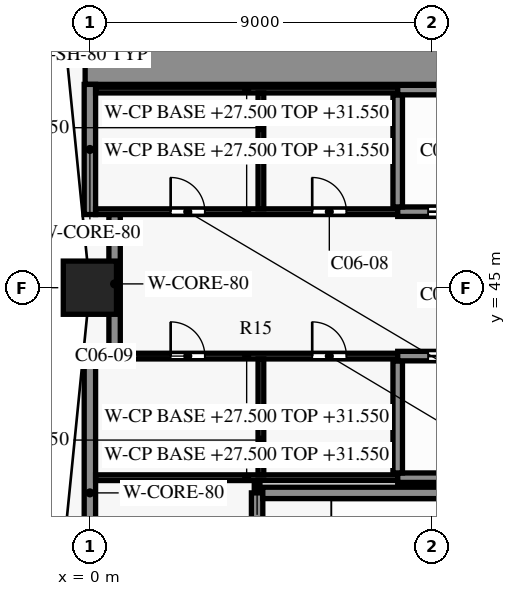
"""IFC4 building model, lengths in metres.
Left out: names, types, materials, properties, quantities, classifications, styles, units other than length and angle.
Written with IfcOpenShell. Run it as: python <this file> out.ifc"""

import sys

from ifc_helpers import new_model, si_unit, direction, frame, frame_2d, origin, origin_2d, place, context, subcontext, project, spatial, rectangle, extrude, element, fill, save


model = new_model("IFC4")
c1 = context("Model", 3, precision=1e-05, world=origin(), true_north=direction((0.0, 1.0)))
c2 = subcontext(c1, "Body", "Model", "MODEL_VIEW")
j1 = project(units=[si_unit("LENGTHUNIT", "METRE"), si_unit("PLANEANGLEUNIT", "RADIAN")], contexts=[c1])
p1 = place(None, origin())
s1 = spatial("IfcSite", under=j1, at=p1, CompositionType="ELEMENT")
p2 = place(p1, origin())
s2 = spatial("IfcBuilding", under=s1, at=p2, CompositionType="ELEMENT")
p3 = place(p2, frame((0.0, 0.0, 27.5)))
s3 = spatial("IfcBuildingStorey", under=s2, at=p3, CompositionType="ELEMENT", Elevation=27.5)
p4 = place(p3, frame((0.0, 45.0, 0.0), z_axis=(0.0, 0.0, 1.0), x_axis=(1.0, 0.0, 0.0)))
e1 = element("IfcColumn", 1, at=p4, inside=s3, PredefinedType="COLUMN", context=c2, shape_type="SweptSolid", body=[
    extrude(rectangle(XDim=1.4, YDim=1.4, at=origin_2d()), origin(), (0.0, 0.0, 1.0), 4.5),
])
p5 = place(p3, frame((4.55, 39.6, 0.0), z_axis=(0.0, 0.0, 1.0), x_axis=(1.0, 0.0, 0.0)))
e2 = element("IfcWall", 2, at=p5, inside=s3, PredefinedType="SHEAR", context=c2, shape_type="SweptSolid", body=[
    extrude(rectangle(XDim=7.7, YDim=0.3, at=frame_2d((3.85, 0.0))), origin(), (0.0, 0.0, 1.0), 4.2),
])
p6 = place(p3, frame((0.15, 40.0, 0.0), z_axis=(0.0, 0.0, 1.0), x_axis=(1.0, 0.0, 0.0)))
e3 = element("IfcWall", 3, at=p6, inside=s3, PredefinedType="PARTITIONING", context=c2, shape_type="SweptSolid", body=[
    extrude(rectangle(XDim=7.95, YDim=0.15, at=frame_2d((3.975, 0.0))), origin(), (0.0, 0.0, 1.0), 4.05),
])
p7 = place(p3, frame((8.1, 40.0, 0.0), z_axis=(0.0, 0.0, 1.0), x_axis=(1.0, 0.0, 0.0)))
e4 = element("IfcWall", 4, at=p7, inside=s3, PredefinedType="SHEAR", context=c2, shape_type="SweptSolid", body=[
    extrude(rectangle(XDim=16.075, YDim=0.25, at=frame_2d((8.038, 0.0))), origin(), (0.0, 0.0, 1.0), 4.2),
])
p8 = place(p3, frame((0.15, 43.2, 0.0), z_axis=(0.0, 0.0, 1.0), x_axis=(1.0, 0.0, 0.0)))
e5 = element("IfcWall", 5, at=p8, inside=s3, PredefinedType="PARTITIONING", context=c2, shape_type="SweptSolid", body=[
    extrude(rectangle(XDim=7.95, YDim=0.15, at=frame_2d((3.975, 0.0))), origin(), (0.0, 0.0, 1.0), 4.05),
])
p9 = place(p8, frame((1.975, 0.0, 0.0)))
e6 = element("IfcOpeningElement", 6, at=p9, cuts=e5, PredefinedType="OPENING", context=c2, shape_type="SweptSolid", body=[
    extrude(rectangle(XDim=0.9, YDim=2.1, at=frame_2d((0.45, 1.05))), frame((0.0, 0.085, 0.0), z_axis=(0.0, -1.0, 0.0), x_axis=(1.0, 0.0, 0.0)), (0.0, 0.0, 1.0), 0.17),
])
p10 = place(p8, frame((5.7, 0.0, 0.0)))
e7 = element("IfcOpeningElement", 7, at=p10, cuts=e5, PredefinedType="OPENING", context=c2, shape_type="SweptSolid", body=[
    extrude(rectangle(XDim=0.9, YDim=2.1, at=frame_2d((0.45, 1.05))), frame((0.0, 0.085, 0.0), z_axis=(0.0, -1.0, 0.0), x_axis=(1.0, 0.0, 0.0)), (0.0, 0.0, 1.0), 0.17),
])
p11 = place(p3, frame((8.1, 43.2, 0.0), z_axis=(0.0, 0.0, 1.0), x_axis=(1.0, 0.0, 0.0)))
e8 = element("IfcWall", 8, at=p11, inside=s3, PredefinedType="SHEAR", context=c2, shape_type="SweptSolid", body=[
    extrude(rectangle(XDim=16.075, YDim=0.25, at=frame_2d((8.038, 0.0))), origin(), (0.0, 0.0, 1.0), 4.2),
])
p12 = place(p11, frame((14.3, 0.0, 0.0)))
e9 = element("IfcOpeningElement", 9, at=p12, cuts=e8, PredefinedType="OPENING", context=c2, shape_type="SweptSolid", body=[
    extrude(rectangle(XDim=1.1, YDim=2.1, at=frame_2d((0.55, 1.05))), frame((0.0, 0.135, 0.0), z_axis=(0.0, -1.0, 0.0), x_axis=(1.0, 0.0, 0.0)), (0.0, 0.0, 1.0), 0.27),
])
p13 = place(p11, frame((0.8, 0.0, 0.0)))
e10 = element("IfcOpeningElement", 10, at=p13, cuts=e8, PredefinedType="OPENING", context=c2, shape_type="SweptSolid", body=[
    extrude(rectangle(XDim=1.1, YDim=2.1, at=frame_2d((0.55, 1.05))), frame((0.0, 0.135, 0.0), z_axis=(0.0, -1.0, 0.0), x_axis=(1.0, 0.0, 0.0)), (0.0, 0.0, 1.0), 0.27),
])
p14 = place(p11, frame((3.5, 0.0, 0.0)))
e11 = element("IfcOpeningElement", 11, at=p14, cuts=e8, PredefinedType="OPENING", context=c2, shape_type="SweptSolid", body=[
    extrude(rectangle(XDim=1.1, YDim=2.1, at=frame_2d((0.55, 1.05))), frame((0.0, 0.135, 0.0), z_axis=(0.0, -1.0, 0.0), x_axis=(1.0, 0.0, 0.0)), (0.0, 0.0, 1.0), 0.27),
])
p15 = place(p11, frame((6.2, 0.0, 0.0)))
e12 = element("IfcOpeningElement", 12, at=p15, cuts=e8, PredefinedType="OPENING", context=c2, shape_type="SweptSolid", body=[
    extrude(rectangle(XDim=1.1, YDim=2.1, at=frame_2d((0.55, 1.05))), frame((0.0, 0.135, 0.0), z_axis=(0.0, -1.0, 0.0), x_axis=(1.0, 0.0, 0.0)), (0.0, 0.0, 1.0), 0.27),
])
p16 = place(p11, frame((8.9, 0.0, 0.0)))
e13 = element("IfcOpeningElement", 13, at=p16, cuts=e8, PredefinedType="OPENING", context=c2, shape_type="SweptSolid", body=[
    extrude(rectangle(XDim=1.1, YDim=2.1, at=frame_2d((0.55, 1.05))), frame((0.0, 0.135, 0.0), z_axis=(0.0, -1.0, 0.0), x_axis=(1.0, 0.0, 0.0)), (0.0, 0.0, 1.0), 0.27),
])
p17 = place(p11, frame((11.6, 0.0, 0.0)))
e14 = element("IfcOpeningElement", 14, at=p17, cuts=e8, PredefinedType="OPENING", context=c2, shape_type="SweptSolid", body=[
    extrude(rectangle(XDim=1.1, YDim=2.1, at=frame_2d((0.55, 1.05))), frame((0.0, 0.135, 0.0), z_axis=(0.0, -1.0, 0.0), x_axis=(1.0, 0.0, 0.0)), (0.0, 0.0, 1.0), 0.27),
])
p18 = place(p3, frame((0.15, 47.0, 0.0), z_axis=(0.0, 0.0, 1.0), x_axis=(1.0, 0.0, 0.0)))
e15 = element("IfcWall", 15, at=p18, inside=s3, PredefinedType="PARTITIONING", context=c2, shape_type="SweptSolid", body=[
    extrude(rectangle(XDim=7.95, YDim=0.15, at=frame_2d((3.975, 0.0))), origin(), (0.0, 0.0, 1.0), 4.05),
])
p19 = place(p18, frame((1.975, 0.0, 0.0)))
e16 = element("IfcOpeningElement", 16, at=p19, cuts=e15, PredefinedType="OPENING", context=c2, shape_type="SweptSolid", body=[
    extrude(rectangle(XDim=0.9, YDim=2.1, at=frame_2d((0.45, 1.05))), frame((0.0, 0.085, 0.0), z_axis=(0.0, -1.0, 0.0), x_axis=(1.0, 0.0, 0.0)), (0.0, 0.0, 1.0), 0.17),
])
p20 = place(p18, frame((5.7, 0.0, 0.0)))
e17 = element("IfcOpeningElement", 17, at=p20, cuts=e15, PredefinedType="OPENING", context=c2, shape_type="SweptSolid", body=[
    extrude(rectangle(XDim=0.9, YDim=2.1, at=frame_2d((0.45, 1.05))), frame((0.0, 0.085, 0.0), z_axis=(0.0, -1.0, 0.0), x_axis=(1.0, 0.0, 0.0)), (0.0, 0.0, 1.0), 0.17),
])
p21 = place(p3, frame((8.1, 47.0, 0.0), z_axis=(0.0, 0.0, 1.0), x_axis=(1.0, 0.0, 0.0)))
e18 = element("IfcWall", 18, at=p21, inside=s3, PredefinedType="SHEAR", context=c2, shape_type="SweptSolid", body=[
    extrude(rectangle(XDim=13.5, YDim=0.25, at=frame_2d((6.75, 0.0))), origin(), (0.0, 0.0, 1.0), 4.2),
])
p22 = place(p21, frame((0.8, 0.0, 0.0)))
e19 = element("IfcOpeningElement", 19, at=p22, cuts=e18, PredefinedType="OPENING", context=c2, shape_type="SweptSolid", body=[
    extrude(rectangle(XDim=1.1, YDim=2.1, at=frame_2d((0.55, 1.05))), frame((0.0, 0.135, 0.0), z_axis=(0.0, -1.0, 0.0), x_axis=(1.0, 0.0, 0.0)), (0.0, 0.0, 1.0), 0.27),
])
p23 = place(p21, frame((3.5, 0.0, 0.0)))
e20 = element("IfcOpeningElement", 20, at=p23, cuts=e18, PredefinedType="OPENING", context=c2, shape_type="SweptSolid", body=[
    extrude(rectangle(XDim=1.1, YDim=2.1, at=frame_2d((0.55, 1.05))), frame((0.0, 0.135, 0.0), z_axis=(0.0, -1.0, 0.0), x_axis=(1.0, 0.0, 0.0)), (0.0, 0.0, 1.0), 0.27),
])
p24 = place(p21, frame((6.2, 0.0, 0.0)))
e21 = element("IfcOpeningElement", 21, at=p24, cuts=e18, PredefinedType="OPENING", context=c2, shape_type="SweptSolid", body=[
    extrude(rectangle(XDim=1.1, YDim=2.1, at=frame_2d((0.55, 1.05))), frame((0.0, 0.135, 0.0), z_axis=(0.0, -1.0, 0.0), x_axis=(1.0, 0.0, 0.0)), (0.0, 0.0, 1.0), 0.27),
])
p25 = place(p21, frame((8.9, 0.0, 0.0)))
e22 = element("IfcOpeningElement", 22, at=p25, cuts=e18, PredefinedType="OPENING", context=c2, shape_type="SweptSolid", body=[
    extrude(rectangle(XDim=1.1, YDim=2.1, at=frame_2d((0.55, 1.05))), frame((0.0, 0.135, 0.0), z_axis=(0.0, -1.0, 0.0), x_axis=(1.0, 0.0, 0.0)), (0.0, 0.0, 1.0), 0.27),
])
p26 = place(p21, frame((11.6, 0.0, 0.0)))
e23 = element("IfcOpeningElement", 23, at=p26, cuts=e18, PredefinedType="OPENING", context=c2, shape_type="SweptSolid", body=[
    extrude(rectangle(XDim=1.1, YDim=2.1, at=frame_2d((0.55, 1.05))), frame((0.0, 0.135, 0.0), z_axis=(0.0, -1.0, 0.0), x_axis=(1.0, 0.0, 0.0)), (0.0, 0.0, 1.0), 0.27),
])
p27 = place(p3, frame((0.15, 50.2, 0.0), z_axis=(0.0, 0.0, 1.0), x_axis=(1.0, 0.0, 0.0)))
e24 = element("IfcWall", 24, at=p27, inside=s3, PredefinedType="PARTITIONING", context=c2, shape_type="SweptSolid", body=[
    extrude(rectangle(XDim=7.95, YDim=0.15, at=frame_2d((3.975, 0.0))), origin(), (0.0, 0.0, 1.0), 4.05),
])
p28 = place(p3, frame((8.1, 50.2, 0.0), z_axis=(0.0, 0.0, 1.0), x_axis=(1.0, 0.0, 0.0)))
e25 = element("IfcWall", 25, at=p28, inside=s3, PredefinedType="SHEAR", context=c2, shape_type="SweptSolid", body=[
    extrude(rectangle(XDim=13.375, YDim=0.25, at=frame_2d((6.688, 0.0))), origin(), (0.0, 0.0, 1.0), 4.2),
])
p29 = place(p3, frame((-0.125, 51.0, 0.0), z_axis=(0.0, 0.0, 1.0), x_axis=(1.0, 0.0, 0.0)))
e26 = element("IfcWall", 26, at=p29, inside=s3, PredefinedType="SHEAR", context=c2, shape_type="SweptSolid", body=[
    extrude(rectangle(XDim=21.625, YDim=1.3, at=frame_2d((10.812, 0.0))), origin(), (0.0, 0.0, 1.0), 4.2),
])
p30 = place(p3, frame((0.0, 35.925, 0.0), z_axis=(0.0, 0.0, 1.0), x_axis=(0.0, 1.0, 0.0)))
e27 = element("IfcWall", 27, at=p30, inside=s3, PredefinedType="SHEAR", context=c2, shape_type="SweptSolid", body=[
    extrude(rectangle(XDim=7.35, YDim=0.3, at=frame_2d((3.675, 0.0))), origin(), (0.0, 0.0, 1.0), 4.2),
])
p31 = place(p3, frame((0.0, 46.925, 0.0), z_axis=(0.0, 0.0, 1.0), x_axis=(0.0, 1.0, 0.0)))
e28 = element("IfcWall", 28, at=p31, inside=s3, PredefinedType="SHEAR", context=c2, shape_type="SweptSolid", body=[
    extrude(rectangle(XDim=3.425, YDim=0.3, at=frame_2d((1.712, 0.0))), origin(), (0.0, 0.0, 1.0), 4.2),
])
p32 = place(p3, frame((0.65, 43.275, 0.0), z_axis=(0.0, 0.0, 1.0), x_axis=(0.0, 1.0, 0.0)))
e29 = element("IfcWall", 29, at=p32, inside=s3, PredefinedType="SHEAR", context=c2, shape_type="SweptSolid", body=[
    extrude(rectangle(XDim=3.65, YDim=0.3, at=frame_2d((1.825, 0.0))), origin(), (0.0, 0.0, 1.0), 4.2),
])
p33 = place(p3, frame((4.4, 39.6, 0.0), z_axis=(0.0, 0.0, 1.0), x_axis=(0.0, 1.0, 0.0)))
e30 = element("IfcWall", 30, at=p33, inside=s3, PredefinedType="PARTITIONING", context=c2, shape_type="SweptSolid", body=[
    extrude(rectangle(XDim=0.325, YDim=0.15, at=frame_2d((0.163, 0.0))), origin(), (0.0, 0.0, 1.0), 4.05),
])
p34 = place(p3, frame((4.4, 36.15, 0.0), z_axis=(0.0, 0.0, 1.0), x_axis=(0.0, 1.0, 0.0)))
e31 = element("IfcWall", 31, at=p34, inside=s3, PredefinedType="SHEAR", context=c2, shape_type="SweptSolid", body=[
    extrude(rectangle(XDim=3.45, YDim=0.3, at=frame_2d((1.725, 0.0))), origin(), (0.0, 0.0, 1.0), 4.2),
])
for number, where, z_axis, x_axis in (
    (32, (4.5, 40.075, 0.0), (0.0, 0.0, 1.0), (0.0, 1.0, 0.0)),
    (33, (4.5, 47.075, 0.0), (0.0, 0.0, 1.0), (0.0, 1.0, 0.0)),
):
    element("IfcWall", number, at=place(p3, frame(where, z_axis=z_axis, x_axis=x_axis)), inside=s3, PredefinedType="PARTITIONING", context=c2, shape_type="SweptSolid", body=[
        extrude(rectangle(XDim=3.05, YDim=0.15, at=frame_2d((1.525, 0.0))), origin(), (0.0, 0.0, 1.0), 4.05),
    ])
for number, where, z_axis, x_axis in (
    (34, (8.1, 40.125, 0.0), (0.0, 0.0, 1.0), (0.0, 1.0, 0.0)),
    (35, (8.1, 47.125, 0.0), (0.0, 0.0, 1.0), (0.0, 1.0, 0.0)),
):
    element("IfcWall", number, at=place(p3, frame(where, z_axis=z_axis, x_axis=x_axis)), inside=s3, PredefinedType="SHEAR", context=c2, shape_type="SweptSolid", body=[
        extrude(rectangle(XDim=2.95, YDim=0.25, at=frame_2d((1.475, 0.0))), origin(), (0.0, 0.0, 1.0), 4.2),
    ])
p35 = place(p19, origin())
e36 = element("IfcDoor", 36, at=p35, inside=s3, OperationType="SINGLE_SWING_RIGHT", PredefinedType="DOOR", context=c2, shape_type="SweptSolid", body=[
    extrude(rectangle(XDim=0.9, YDim=2.1, at=frame_2d((0.45, 1.05))), frame((0.0, 0.025, 0.0), z_axis=(0.0, -1.0, 0.0), x_axis=(1.0, 0.0, 0.0)), (0.0, 0.0, 1.0), 0.05),
])
fill(e16, e36)
p36 = place(p20, origin())
e37 = element("IfcDoor", 37, at=p36, inside=s3, OperationType="SINGLE_SWING_LEFT", PredefinedType="DOOR", context=c2, shape_type="SweptSolid", body=[
    extrude(rectangle(XDim=0.9, YDim=2.1, at=frame_2d((0.45, 1.05))), frame((0.0, 0.025, 0.0), z_axis=(0.0, -1.0, 0.0), x_axis=(1.0, 0.0, 0.0)), (0.0, 0.0, 1.0), 0.05),
])
fill(e17, e37)
p37 = place(p9, origin())
e38 = element("IfcDoor", 38, at=p37, inside=s3, OperationType="SINGLE_SWING_LEFT", PredefinedType="DOOR", context=c2, shape_type="SweptSolid", body=[
    extrude(rectangle(XDim=0.9, YDim=2.1, at=frame_2d((0.45, 1.05))), frame((0.0, 0.025, 0.0), z_axis=(0.0, -1.0, 0.0), x_axis=(1.0, 0.0, 0.0)), (0.0, 0.0, 1.0), 0.05),
])
fill(e6, e38)
p38 = place(p10, origin())
e39 = element("IfcDoor", 39, at=p38, inside=s3, OperationType="SINGLE_SWING_RIGHT", PredefinedType="DOOR", context=c2, shape_type="SweptSolid", body=[
    extrude(rectangle(XDim=0.9, YDim=2.1, at=frame_2d((0.45, 1.05))), frame((0.0, 0.025, 0.0), z_axis=(0.0, -1.0, 0.0), x_axis=(1.0, 0.0, 0.0)), (0.0, 0.0, 1.0), 0.05),
])
fill(e7, e39)
p39 = place(p13, origin())
e40 = element("IfcDoor", 40, at=p39, inside=s3, OperationType="DOUBLE_DOOR_SLIDING", PredefinedType="DOOR", context=c2, shape_type="SweptSolid", body=[
    extrude(rectangle(XDim=1.1, YDim=2.1, at=frame_2d((0.55, 1.05))), frame((0.0, 0.025, 0.0), z_axis=(0.0, -1.0, 0.0), x_axis=(1.0, 0.0, 0.0)), (0.0, 0.0, 1.0), 0.05),
])
fill(e10, e40)
p40 = place(p22, origin())
e41 = element("IfcDoor", 41, at=p40, inside=s3, OperationType="DOUBLE_DOOR_SLIDING", PredefinedType="DOOR", context=c2, shape_type="SweptSolid", body=[
    extrude(rectangle(XDim=1.1, YDim=2.1, at=frame_2d((0.55, 1.05))), frame((0.0, 0.025, 0.0), z_axis=(0.0, -1.0, 0.0), x_axis=(1.0, 0.0, 0.0)), (0.0, 0.0, 1.0), 0.05),
])
fill(e19, e41)
save(model, sys.argv[1])
